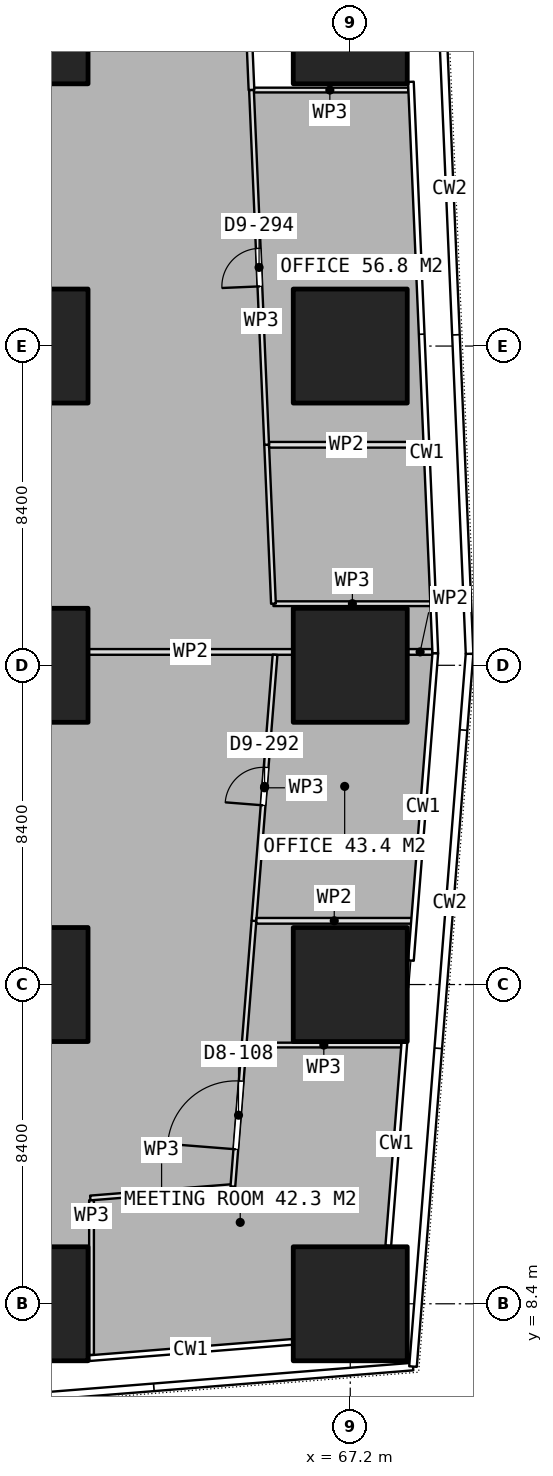
"""IFC4 building model, lengths in metres.
Left out: names, types, materials, properties, quantities, classifications, styles, units other than length and angle.
Written with IfcOpenShell. Run it as: python <this file> out.ifc"""

import sys

from ifc_helpers import new_model, si_unit, direction, frame, frame_2d, origin, origin_2d, place, context, subcontext, project, spatial, rectangle, extrude, element, fill, save


model = new_model("IFC4")
c1 = context("Model", 3, precision=1e-05, world=origin(), true_north=direction((0.0, 1.0)))
c2 = subcontext(c1, "Body", "Model", "MODEL_VIEW")
j1 = project(units=[si_unit("LENGTHUNIT", "METRE"), si_unit("PLANEANGLEUNIT", "RADIAN")], contexts=[c1])
p1 = place(None, origin())
s1 = spatial("IfcSite", under=j1, at=p1, CompositionType="ELEMENT")
p2 = place(p1, origin())
s2 = spatial("IfcBuilding", under=s1, at=p2, CompositionType="ELEMENT")
p3 = place(p2, frame((0.0, 0.0, 81.65)))
s3 = spatial("IfcBuildingStorey", under=s2, at=p3, CompositionType="ELEMENT", Elevation=81.65)
for number, where, z_axis, x_axis in (
    (1, (58.8, 8.4, 0.0), (0.0, 0.0, 1.0), (1.0, 0.0, 0.0)),
    (2, (58.8, 16.8, 0.0), (0.0, 0.0, 1.0), (1.0, 0.0, 0.0)),
    (3, (58.8, 25.2, 0.0), (0.0, 0.0, 1.0), (1.0, 0.0, 0.0)),
    (4, (58.8, 33.6, 0.0), (0.0, 0.0, 1.0), (1.0, 0.0, 0.0)),
    (5, (58.8, 42.0, 0.0), (0.0, 0.0, 1.0), (1.0, 0.0, 0.0)),
    (6, (67.2, 8.4, 0.0), (0.0, 0.0, 1.0), (1.0, 0.0, 0.0)),
    (7, (67.2, 16.8, 0.0), (0.0, 0.0, 1.0), (1.0, 0.0, 0.0)),
    (8, (67.2, 25.2, 0.0), (0.0, 0.0, 1.0), (1.0, 0.0, 0.0)),
    (9, (67.2, 33.6, 0.0), (0.0, 0.0, 1.0), (1.0, 0.0, 0.0)),
    (10, (67.2, 42.0, 0.0), (0.0, 0.0, 1.0), (1.0, 0.0, 0.0)),
):
    element("IfcColumn", number, at=place(p3, frame(where, z_axis=z_axis, x_axis=x_axis)), inside=s3, PredefinedType="COLUMN", context=c2, shape_type="SweptSolid", body=[
        extrude(rectangle(XDim=3.0, YDim=3.0, at=origin_2d()), origin(), (0.0, 0.0, 1.0), 3.75),
    ])
p4 = place(p3, frame((64.601, 40.336, 0.0), z_axis=(0.0, 0.0, 1.0), x_axis=(1.0, 0.0, 0.0)))
e11 = element("IfcWall", 11, at=p4, inside=s3, PredefinedType="PARTITIONING", context=c2, shape_type="SweptSolid", body=[
    extrude(rectangle(XDim=4.124, YDim=0.125, at=frame_2d((2.062, 0.0))), origin(), (0.0, 0.0, 1.0), 3.4),
])
p5 = place(p3, frame((69.333, 26.821, 0.0), z_axis=(0.0, 0.0, 1.0), x_axis=(-1.0, 0.0, 0.0)))
e12 = element("IfcWall", 12, at=p5, inside=s3, PredefinedType="PARTITIONING", context=c2, shape_type="SweptSolid", body=[
    extrude(rectangle(XDim=4.154, YDim=0.125, at=frame_2d((2.077, 0.0))), origin(), (0.0, 0.0, 1.0), 3.4),
])
p6 = place(p3, frame((65.179, 26.821, 0.0), z_axis=(0.0, 0.0, 1.0), x_axis=(-0.042753796075, 0.999085638432, 0.0)))
e13 = element("IfcWall", 13, at=p6, inside=s3, PredefinedType="PARTITIONING", context=c2, shape_type="SweptSolid", body=[
    extrude(rectangle(XDim=4.186, YDim=0.125, at=frame_2d((2.093, 0.0))), origin(), (0.0, 0.0, 1.0), 3.4),
])
p7 = place(p3, frame((65.0, 31.003, 0.0), z_axis=(0.0, 0.0, 1.0), x_axis=(-0.042704545751, 0.999087744781, 0.0)))
e14 = element("IfcWall", 14, at=p7, inside=s3, PredefinedType="PARTITIONING", context=c2, shape_type="SweptSolid", body=[
    extrude(rectangle(XDim=9.342, YDim=0.125, at=frame_2d((4.671, 0.0))), origin(), (0.0, 0.0, 1.0), 3.4),
])
p8 = place(p7, frame((4.171, 0.0, 0.0)))
e15 = element("IfcOpeningElement", 15, at=p8, cuts=e14, PredefinedType="OPENING", context=c2, shape_type="SweptSolid", body=[
    extrude(rectangle(XDim=1.0, YDim=2.1, at=frame_2d((0.5, 1.05))), frame((0.0, 0.073, 0.0), z_axis=(0.0, -1.0, 0.0), x_axis=(1.0, 0.0, 0.0)), (0.0, 0.0, 1.0), 0.145),
])
p9 = place(p3, frame((64.464, 43.556, 0.0), z_axis=(0.0, 0.0, 1.0), x_axis=(0.042509888652, -0.999096046117, 0.0)))
e16 = element("IfcWall", 16, at=p9, inside=s3, PredefinedType="PARTITIONING", context=c2, shape_type="SweptSolid", body=[
    extrude(rectangle(XDim=3.222, YDim=0.15, at=frame_2d((1.611, 0.0))), origin(), (0.0, 0.0, 1.0), 3.4),
])
p10 = place(p3, frame((65.063, 31.002, 0.0), z_axis=(0.0, 0.0, 1.0), x_axis=(1.0, 0.0, 0.0)))
e17 = element("IfcWall", 17, at=p10, inside=s3, PredefinedType="PARTITIONING", context=c2, shape_type="SweptSolid", body=[
    extrude(rectangle(XDim=4.061, YDim=0.15, at=frame_2d((2.031, 0.0))), origin(), (0.0, 0.0, 1.0), 3.4),
])
p11 = place(p3, frame((69.357, 25.552, 0.0), z_axis=(0.0, 0.0, 1.0), x_axis=(-1.0, 0.0, 0.0)))
e18 = element("IfcWall", 18, at=p11, inside=s3, PredefinedType="PARTITIONING", context=c2, shape_type="SweptSolid", body=[
    extrude(rectangle(XDim=0.637, YDim=0.15, at=frame_2d((0.318, 0.0))), origin(), (0.0, 0.0, 1.0), 3.4),
])
p12 = place(p3, frame((65.68, 25.552, 0.0), z_axis=(0.0, 0.0, 1.0), x_axis=(-1.0, 0.0, 0.0)))
e19 = element("IfcWall", 19, at=p12, inside=s3, PredefinedType="PARTITIONING", context=c2, shape_type="SweptSolid", body=[
    extrude(rectangle(XDim=5.36, YDim=0.15, at=frame_2d((2.68, 0.0))), origin(), (0.0, 0.0, 1.0), 3.4),
])
p13 = place(p3, frame((60.36, 11.184, 0.0), z_axis=(0.0, 0.0, 1.0), x_axis=(0.996795236894, 0.079995348027, 0.0)))
e20 = element("IfcWall", 20, at=p13, inside=s3, PredefinedType="PARTITIONING", context=c2, shape_type="SweptSolid", body=[
    extrude(rectangle(XDim=3.763, YDim=0.125, at=frame_2d((1.881, 0.0))), origin(), (0.0, 0.0, 1.0), 3.4),
])
p14 = place(p3, frame((64.111, 11.485, 0.0), z_axis=(0.0, 0.0, 1.0), x_axis=(0.079075405568, 0.996868637401, 0.0)))
e21 = element("IfcWall", 21, at=p14, inside=s3, PredefinedType="PARTITIONING", context=c2, shape_type="SweptSolid", body=[
    extrude(rectangle(XDim=3.767, YDim=0.125, at=frame_2d((1.883, 0.0))), origin(), (0.0, 0.0, 1.0), 3.4),
])
p15 = place(p14, frame((0.983, 0.0, 0.0)))
e22 = element("IfcOpeningElement", 22, at=p15, cuts=e21, PredefinedType="OPENING", context=c2, shape_type="SweptSolid", body=[
    extrude(rectangle(XDim=1.8, YDim=2.1, at=frame_2d((0.9, 1.05))), frame((0.0, 0.073, 0.0), z_axis=(0.0, -1.0, 0.0), x_axis=(1.0, 0.0, 0.0)), (0.0, 0.0, 1.0), 0.145),
])
p16 = place(p3, frame((64.469, 15.208, 0.0), z_axis=(0.0, 0.0, 1.0), x_axis=(1.0, 0.0, 0.0)))
e23 = element("IfcWall", 23, at=p16, inside=s3, PredefinedType="PARTITIONING", context=c2, shape_type="SweptSolid", body=[
    extrude(rectangle(XDim=4.071, YDim=0.125, at=frame_2d((2.036, 0.0))), origin(), (0.0, 0.0, 1.0), 3.4),
])
p17 = place(p3, frame((60.392, 7.054, 0.0), z_axis=(0.0, 0.0, 1.0), x_axis=(0.0, 1.0, 0.0)))
e24 = element("IfcWall", 24, at=p17, inside=s3, PredefinedType="PARTITIONING", context=c2, shape_type="SweptSolid", body=[
    extrude(rectangle(XDim=4.07, YDim=0.125, at=frame_2d((2.035, 0.0))), origin(), (0.0, 0.0, 1.0), 3.4),
])
p18 = place(p3, frame((64.409, 15.241, 0.0), z_axis=(0.0, 0.0, 1.0), x_axis=(0.079215977886, 0.996857476697, 0.0)))
e25 = element("IfcWall", 25, at=p18, inside=s3, PredefinedType="PARTITIONING", context=c2, shape_type="SweptSolid", body=[
    extrude(rectangle(XDim=3.245, YDim=0.125, at=frame_2d((1.623, 0.0))), origin(), (0.0, 0.0, 1.0), 3.4),
])
p19 = place(p3, frame((64.666, 18.476, 0.0), z_axis=(0.0, 0.0, 1.0), x_axis=(0.079017050166, 0.996873264655, 0.0)))
e26 = element("IfcWall", 26, at=p19, inside=s3, PredefinedType="PARTITIONING", context=c2, shape_type="SweptSolid", body=[
    extrude(rectangle(XDim=7.023, YDim=0.125, at=frame_2d((3.511, 0.0))), origin(), (0.0, 0.0, 1.0), 3.4),
])
p20 = place(p19, frame((3.049, 0.0, 0.0)))
e27 = element("IfcOpeningElement", 27, at=p20, cuts=e26, PredefinedType="OPENING", context=c2, shape_type="SweptSolid", body=[
    extrude(rectangle(XDim=1.0, YDim=2.1, at=frame_2d((0.5, 1.05))), frame((0.0, 0.073, 0.0), z_axis=(0.0, -1.0, 0.0), x_axis=(1.0, 0.0, 0.0)), (0.0, 0.0, 1.0), 0.145),
])
p21 = place(p3, frame((64.729, 18.477, 0.0), z_axis=(0.0, 0.0, 1.0), x_axis=(1.0, 0.0, 0.0)))
e28 = element("IfcWall", 28, at=p21, inside=s3, PredefinedType="PARTITIONING", context=c2, shape_type="SweptSolid", body=[
    extrude(rectangle(XDim=4.1, YDim=0.15, at=frame_2d((2.05, 0.0))), origin(), (0.0, 0.0, 1.0), 3.4),
])
p22 = place(p8, origin())
e29 = element("IfcDoor", 29, at=p22, inside=s3, OperationType="SINGLE_SWING_LEFT", PredefinedType="DOOR", context=c2, shape_type="SweptSolid", body=[
    extrude(rectangle(XDim=1.0, YDim=2.1, at=frame_2d((0.5, 1.05))), frame((0.0, 0.025, 0.0), z_axis=(0.0, -1.0, 0.0), x_axis=(1.0, 0.0, 0.0)), (0.0, 0.0, 1.0), 0.05),
])
fill(e15, e29)
p23 = place(p15, origin())
e30 = element("IfcDoor", 30, at=p23, inside=s3, OperationType="DOUBLE_DOOR_SINGLE_SWING", PredefinedType="DOOR", context=c2, shape_type="SweptSolid", body=[
    extrude(rectangle(XDim=1.8, YDim=2.1, at=frame_2d((0.9, 1.05))), frame((0.0, 0.025, 0.0), z_axis=(0.0, -1.0, 0.0), x_axis=(1.0, 0.0, 0.0)), (0.0, 0.0, 1.0), 0.05),
])
fill(e22, e30)
p24 = place(p20, origin())
e31 = element("IfcDoor", 31, at=p24, inside=s3, OperationType="SINGLE_SWING_LEFT", PredefinedType="DOOR", context=c2, shape_type="SweptSolid", body=[
    extrude(rectangle(XDim=1.0, YDim=2.1, at=frame_2d((0.5, 1.05))), frame((0.0, 0.025, 0.0), z_axis=(0.0, -1.0, 0.0), x_axis=(1.0, 0.0, 0.0)), (0.0, 0.0, 1.0), 0.05),
])
fill(e27, e31)
save(model, sys.argv[1])
